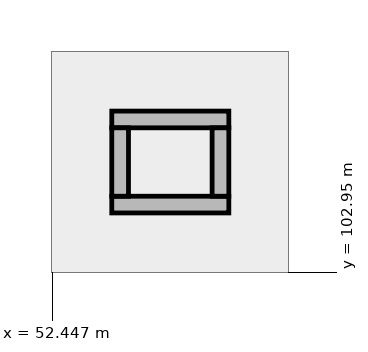
"""IFC4 building model, lengths in metres.
Left out: names, types, materials, properties, quantities, classifications, styles, units other than length and angle.
Written with IfcOpenShell. Run it as: python <this file> out.ifc"""

import sys

from ifc_helpers import new_model, si_unit, direction, frame, frame_2d, origin, place, context, subcontext, project, spatial, rectangle, extrude, element, save


model = new_model("IFC4")
c1 = context("Model", 3, precision=1e-05, world=origin(), true_north=direction((0.0, 1.0)))
c2 = subcontext(c1, "Body", "Model", "MODEL_VIEW")
j1 = project(units=[si_unit("LENGTHUNIT", "METRE"), si_unit("PLANEANGLEUNIT", "RADIAN")], contexts=[c1])
p1 = place(None, origin())
s1 = spatial("IfcSite", under=j1, at=p1, CompositionType="ELEMENT")
p2 = place(p1, origin())
s2 = spatial("IfcBuilding", under=s1, at=p2, CompositionType="ELEMENT")
p3 = place(p2, frame((0.0, 0.0, -4.5)))
s3 = spatial("IfcBuildingStorey", under=s2, at=p3, CompositionType="ELEMENT", Elevation=-4.5)
for number, where, z_axis, x_axis in (
    (1, (53.23, 103.84, 0.0), (0.0, 0.0, 1.0), (1.0, 0.0, 0.0)),
    (2, (53.23, 104.96, 0.0), (0.0, 0.0, 1.0), (1.0, 0.0, 0.0)),
):
    element("IfcWall", number, at=place(p3, frame(where, z_axis=z_axis, x_axis=x_axis)), inside=s3, PredefinedType="STANDARD", context=c2, shape_type="SweptSolid", body=[
        extrude(rectangle(XDim=1.54, YDim=0.22, at=frame_2d((0.77, 0.0))), origin(), (0.0, 0.0, 1.0), 3.19),
    ])
for number, where, z_axis, x_axis in (
    (3, (53.34, 103.95, 0.0), (0.0, 0.0, 1.0), (0.0, 1.0, 0.0)),
    (4, (54.66, 103.95, 0.0), (0.0, 0.0, 1.0), (0.0, 1.0, 0.0)),
):
    element("IfcWall", number, at=place(p3, frame(where, z_axis=z_axis, x_axis=x_axis)), inside=s3, PredefinedType="STANDARD", context=c2, shape_type="SweptSolid", body=[
        extrude(rectangle(XDim=0.9, YDim=0.22, at=frame_2d((0.45, 0.0))), origin(), (0.0, 0.0, 1.0), 3.19),
    ])
save(model, sys.argv[1])
